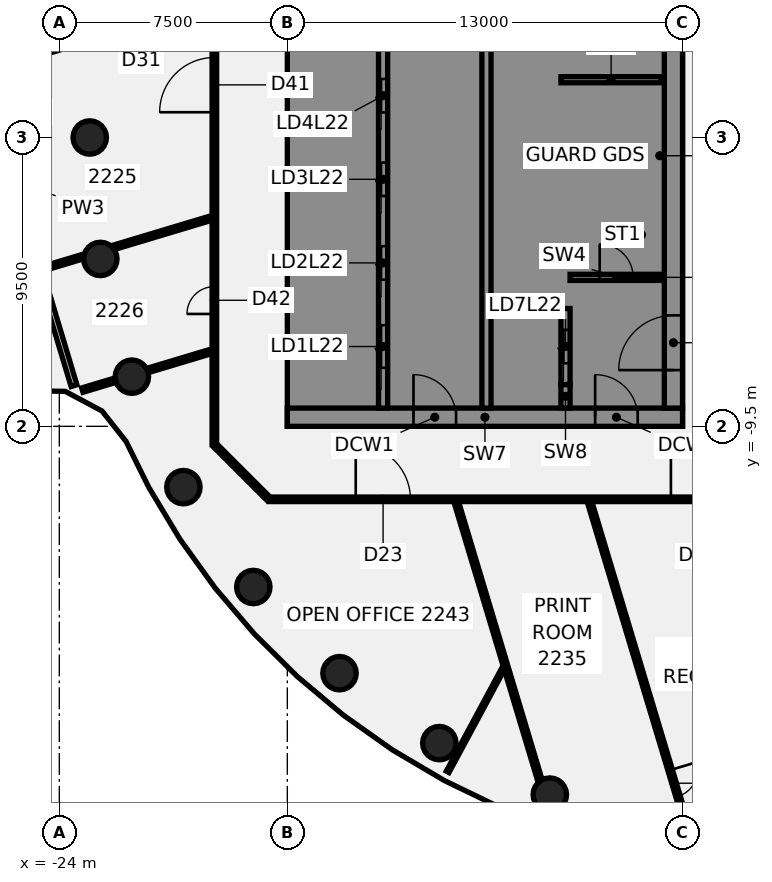
"""IFC4 building model, lengths in metres.
Left out: names, types, materials, properties, quantities, classifications, styles, units other than length and angle.
Written with IfcOpenShell. Run it as: python <this file> out.ifc"""

import sys

from ifc_helpers import new_model, si_unit, direction, frame, frame_2d, origin, origin_2d, place, context, subcontext, project, spatial, polyline, rectangle, circle, outline, extrude, element, fill, save


model = new_model("IFC4")
c1 = context("Model", 3, precision=1e-05, world=origin(), true_north=direction((0.0, 1.0)))
c2 = subcontext(c1, "Body", "Model", "MODEL_VIEW")
j1 = project(units=[si_unit("LENGTHUNIT", "METRE"), si_unit("PLANEANGLEUNIT", "RADIAN")], contexts=[c1])
p1 = place(None, origin())
s1 = spatial("IfcSite", under=j1, at=p1, CompositionType="ELEMENT")
p2 = place(p1, origin())
s2 = spatial("IfcBuilding", under=s1, at=p2, CompositionType="ELEMENT")
p3 = place(p2, frame((0.0, 0.0, 94.75)))
s3 = spatial("IfcBuildingStorey", under=s2, at=p3, CompositionType="ELEMENT", Elevation=94.75)
for number, where, z_axis, x_axis in (
    (1, (-23.0, 0.0, -0.14), (0.0, 0.0, 1.0), (1.0, 0.0, 0.0)),
    (2, (-22.651, -3.994, -0.14), (0.0, 0.0, 1.0), (1.0, 0.0, 0.0)),
    (3, (-21.613, -7.866, -0.14), (0.0, 0.0, 1.0), (1.0, 0.0, 0.0)),
    (4, (-19.919, -11.5, -0.14), (0.0, 0.0, 1.0), (1.0, 0.0, 0.0)),
    (5, (-17.619, -14.784, -0.14), (0.0, 0.0, 1.0), (1.0, 0.0, 0.0)),
    (6, (-14.784, -17.619, -0.14), (0.0, 0.0, 1.0), (1.0, 0.0, 0.0)),
    (7, (-11.5, -19.919, -0.14), (0.0, 0.0, 1.0), (1.0, 0.0, 0.0)),
    (8, (-7.866, -21.613, -0.14), (0.0, 0.0, 1.0), (1.0, 0.0, 0.0)),
):
    element("IfcColumn", number, at=place(p3, frame(where, z_axis=z_axis, x_axis=x_axis)), inside=s3, PredefinedType="COLUMN", context=c2, shape_type="SweptSolid", body=[
        extrude(circle(Radius=0.55, at=origin_2d()), origin(), (0.0, 0.0, 1.0), 3.75),
    ])
p4 = place(p3, frame((-27.567, 5.323, 0.0), z_axis=(0.0, 0.0, 1.0), x_axis=(0.287621482127, -0.957744163657, 0.0)))
e9 = element("IfcWall", 9, at=p4, inside=s3, PredefinedType="PARTITIONING", context=c2, shape_type="SweptSolid", body=[
    extrude(rectangle(XDim=14.08, YDim=0.2, at=frame_2d((7.04, 0.0))), origin(), (0.0, 0.0, 1.0), 3.01),
])
p5 = place(p4, frame((5.799, 0.0, 0.0)))
e10 = element("IfcOpeningElement", 10, at=p5, cuts=e9, PredefinedType="OPENING", context=c2, shape_type="SweptSolid", body=[
    extrude(rectangle(XDim=1.4, YDim=2.1, at=frame_2d((0.7, 1.05))), frame((0.0, 0.11, 0.0), z_axis=(0.0, -1.0, 0.0), x_axis=(1.0, 0.0, 0.0)), (0.0, 0.0, 1.0), 0.22),
])
p6 = place(p3, frame((-10.946, -11.977, 0.0), z_axis=(0.0, 0.0, 1.0), x_axis=(0.287700322185, -0.957720483552, 0.0)))
e11 = element("IfcWall", 11, at=p6, inside=s3, PredefinedType="PARTITIONING", context=c2, shape_type="SweptSolid", body=[
    extrude(rectangle(XDim=9.596, YDim=0.15, at=frame_2d((4.798, 0.0))), origin(), (0.0, 0.0, 1.0), 3.01),
])
p7 = place(p3, frame((-6.56, -11.977, 0.0), z_axis=(0.0, 0.0, 1.0), x_axis=(0.28763547446, -0.957739961489, 0.0)))
e12 = element("IfcWall", 12, at=p7, inside=s3, PredefinedType="PARTITIONING", context=c2, shape_type="SweptSolid", body=[
    extrude(rectangle(XDim=15.187, YDim=0.15, at=frame_2d((7.593, 0.0))), origin(), (0.0, 0.0, 1.0), 3.01),
])
p8 = place(p7, frame((9.22, 0.0, 0.0)))
e13 = element("IfcOpeningElement", 13, at=p8, cuts=e12, PredefinedType="OPENING", context=c2, shape_type="SweptSolid", body=[
    extrude(rectangle(XDim=0.9, YDim=2.1, at=frame_2d((0.45, 1.05))), frame((0.0, 0.085, 0.0), z_axis=(0.0, -1.0, 0.0), x_axis=(1.0, 0.0, 0.0)), (0.0, 0.0, 1.0), 0.17),
])
p9 = place(p3, frame((-18.872, -10.128, 0.0), z_axis=(0.0, 0.0, 1.0), x_axis=(0.707106781187, -0.707106781187, 0.0)))
e14 = element("IfcWall", 14, at=p9, inside=s3, PredefinedType="PARTITIONING", context=c2, shape_type="SweptSolid", body=[
    extrude(rectangle(XDim=2.465, YDim=0.15, at=frame_2d((1.232, 0.0))), origin(), (0.0, 0.0, 1.0), 3.01),
])
p10 = place(p3, frame((-17.1, -11.9, 0.0), z_axis=(0.0, 0.0, 1.0), x_axis=(1.0, 0.0, 0.0)))
e15 = element("IfcWall", 15, at=p10, inside=s3, PredefinedType="PARTITIONING", context=c2, shape_type="SweptSolid", body=[
    extrude(rectangle(XDim=34.165, YDim=0.15, at=frame_2d((17.083, 0.0))), origin(), (0.0, 0.0, 1.0), 3.01),
])
p11 = place(p10, frame((13.217, 0.0, 0.0)))
e16 = element("IfcOpeningElement", 16, at=p11, cuts=e15, PredefinedType="OPENING", context=c2, shape_type="SweptSolid", body=[
    extrude(rectangle(XDim=1.8, YDim=2.1, at=frame_2d((0.9, 1.05))), frame((0.0, 0.085, 0.0), z_axis=(0.0, -1.0, 0.0), x_axis=(1.0, 0.0, 0.0)), (0.0, 0.0, 1.0), 0.17),
])
p12 = place(p10, frame((2.85, 0.0, 0.0)))
e17 = element("IfcOpeningElement", 17, at=p12, cuts=e15, PredefinedType="OPENING", context=c2, shape_type="SweptSolid", body=[
    extrude(rectangle(XDim=1.8, YDim=2.1, at=frame_2d((0.9, 1.05))), frame((0.0, 0.085, 0.0), z_axis=(0.0, -1.0, 0.0), x_axis=(1.0, 0.0, 0.0)), (0.0, 0.0, 1.0), 0.17),
])
p13 = place(p10, frame((27.102, 0.0, 0.0)))
e18 = element("IfcOpeningElement", 18, at=p13, cuts=e15, PredefinedType="OPENING", context=c2, shape_type="SweptSolid", body=[
    extrude(rectangle(XDim=1.8, YDim=2.1, at=frame_2d((0.9, 1.05))), frame((0.0, 0.085, 0.0), z_axis=(0.0, -1.0, 0.0), x_axis=(1.0, 0.0, 0.0)), (0.0, 0.0, 1.0), 0.17),
])
p14 = place(p3, frame((-26.521, 2.192, 0.0), z_axis=(0.0, 0.0, 1.0), x_axis=(0.95773155265, 0.287663471886, 0.0)))
e19 = element("IfcWall", 19, at=p14, inside=s3, PredefinedType="PARTITIONING", context=c2, shape_type="SweptSolid", body=[
    extrude(rectangle(XDim=7.878, YDim=0.15, at=frame_2d((3.939, 0.0))), origin(), (0.0, 0.0, 1.0), 3.01),
])
p15 = place(p14, frame((5.0, 0.0, 0.0)))
e20 = element("IfcOpeningElement", 20, at=p15, cuts=e19, PredefinedType="OPENING", context=c2, shape_type="SweptSolid", body=[
    extrude(rectangle(XDim=0.9, YDim=2.1, at=frame_2d((0.45, 1.05))), frame((0.0, 0.085, 0.0), z_axis=(0.0, -1.0, 0.0), x_axis=(1.0, 0.0, 0.0)), (0.0, 0.0, 1.0), 0.17),
])
p16 = place(p3, frame((-24.565, -4.32, 0.0), z_axis=(0.0, 0.0, 1.0), x_axis=(0.957756211779, 0.287581360313, 0.0)))
e21 = element("IfcWall", 21, at=p16, inside=s3, PredefinedType="PARTITIONING", context=c2, shape_type="SweptSolid", body=[
    extrude(rectangle(XDim=1.439, YDim=0.15, at=frame_2d((0.719, 0.0))), origin(), (0.0, 0.0, 1.0), 3.01),
])
p17 = place(p3, frame((-22.253, -3.626, 0.0), z_axis=(0.0, 0.0, 1.0), x_axis=(0.957759484512, 0.287570460631, 0.0)))
e22 = element("IfcWall", 22, at=p17, inside=s3, PredefinedType="PARTITIONING", context=c2, shape_type="SweptSolid", body=[
    extrude(rectangle(XDim=3.421, YDim=0.15, at=frame_2d((1.711, 0.0))), origin(), (0.0, 0.0, 1.0), 3.01),
])
p18 = place(p3, frame((-23.243, -8.309, 0.0), z_axis=(0.0, 0.0, 1.0), x_axis=(0.957738472146, 0.287640433477, 0.0)))
e23 = element("IfcWall", 23, at=p18, inside=s3, PredefinedType="PARTITIONING", context=c2, shape_type="SweptSolid", body=[
    extrude(rectangle(XDim=1.148, YDim=0.15, at=frame_2d((0.574, 0.0))), origin(), (0.0, 0.0, 1.0), 3.01),
])
p19 = place(p3, frame((-21.106, -7.667, 0.0), z_axis=(0.0, 0.0, 1.0), x_axis=(0.957741640757, 0.287629882942, 0.0)))
e24 = element("IfcWall", 24, at=p19, inside=s3, PredefinedType="PARTITIONING", context=c2, shape_type="SweptSolid", body=[
    extrude(rectangle(XDim=2.224, YDim=0.15, at=frame_2d((1.112, 0.0))), origin(), (0.0, 0.0, 1.0), 3.01),
])
p20 = place(p3, frame((-11.227, -20.864, 0.0), z_axis=(0.0, 0.0, 1.0), x_axis=(0.473926336856, 0.880564493512, 0.0)))
e25 = element("IfcWall", 25, at=p20, inside=s3, PredefinedType="PARTITIONING", context=c2, shape_type="SweptSolid", body=[
    extrude(rectangle(XDim=3.861, YDim=0.1, at=frame_2d((1.93, 0.0))), origin(), (0.0, 0.0, 1.0), 3.01),
])
p21 = place(p3, frame((-18.9, -10.1, 0.0), z_axis=(0.0, 0.0, 1.0), x_axis=(0.0, 1.0, 0.0)))
e26 = element("IfcWall", 26, at=p21, inside=s3, PredefinedType="PARTITIONING", context=c2, shape_type="SweptSolid", body=[
    extrude(rectangle(XDim=20.2, YDim=0.15, at=frame_2d((10.1, 0.0))), origin(), (0.0, 0.0, 1.0), 3.01),
])
p22 = place(p21, frame((10.931, 0.0, 0.0)))
e27 = element("IfcOpeningElement", 27, at=p22, cuts=e26, PredefinedType="OPENING", context=c2, shape_type="SweptSolid", body=[
    extrude(rectangle(XDim=1.8, YDim=2.1, at=frame_2d((0.9, 1.05))), frame((0.0, 0.085, 0.0), z_axis=(0.0, -1.0, 0.0), x_axis=(1.0, 0.0, 0.0)), (0.0, 0.0, 1.0), 0.17),
])
p23 = place(p21, frame((4.296, 0.0, 0.0)))
e28 = element("IfcOpeningElement", 28, at=p23, cuts=e26, PredefinedType="OPENING", context=c2, shape_type="SweptSolid", body=[
    extrude(rectangle(XDim=0.9, YDim=2.1, at=frame_2d((0.45, 1.05))), frame((0.0, 0.085, 0.0), z_axis=(0.0, -1.0, 0.0), x_axis=(1.0, 0.0, 0.0)), (0.0, 0.0, 1.0), 0.17),
])
p24 = place(p3, frame((-16.5, -9.2, 0.0), z_axis=(0.0, 0.0, 1.0), x_axis=(1.0, 0.0, 0.0)))
e29 = element("IfcWall", 29, at=p24, inside=s3, PredefinedType="SHEAR", context=c2, shape_type="SweptSolid", body=[
    extrude(rectangle(XDim=13.0, YDim=0.6, at=frame_2d((6.5, 0.0))), origin(), (0.0, 0.0, 1.0), 3.61),
])
p25 = place(p24, frame((4.15, 0.0, 0.0)))
e30 = element("IfcOpeningElement", 30, at=p25, cuts=e29, PredefinedType="OPENING", context=c2, shape_type="SweptSolid", body=[
    extrude(rectangle(XDim=1.4, YDim=2.1, at=frame_2d((0.7, 1.05))), frame((0.0, 0.31, 0.0), z_axis=(0.0, -1.0, 0.0), x_axis=(1.0, 0.0, 0.0)), (0.0, 0.0, 1.0), 0.62),
])
p26 = place(p24, frame((10.125, 0.0, 0.0)))
e31 = element("IfcOpeningElement", 31, at=p26, cuts=e29, PredefinedType="OPENING", context=c2, shape_type="SweptSolid", body=[
    extrude(rectangle(XDim=1.4, YDim=2.1, at=frame_2d((0.7, 1.05))), frame((0.0, 0.31, 0.0), z_axis=(0.0, -1.0, 0.0), x_axis=(1.0, 0.0, 0.0)), (0.0, 0.0, 1.0), 0.62),
])
p27 = place(p3, origin())
e32 = element("IfcWall", 32, at=p27, inside=s3, PredefinedType="SHEAR", context=c2, shape_type="SweptSolid", body=[
    extrude(outline(polyline([(-13.5, -8.9), (-13.5, -8.125), (-15.9, -8.125), (-15.9, -5.625), (-13.5, -5.625), (-13.5, -5.375), (-15.9, -5.375), (-15.9, -2.875), (-13.5, -2.875), (-13.5, -2.625), (-15.9, -2.625), (-15.9, -0.125), (-13.5, -0.125), (-13.5, 0.125), (-15.9, 0.125), (-15.9, 2.625), (-13.5, 2.625), (-13.5, 2.875), (-15.9, 2.875), (-15.9, 5.375), (-13.5, 5.375), (-13.5, 5.625), (-15.9, 5.625), (-15.9, 8.125), (-13.5, 8.125), (-13.5, 8.9), (-15.9, 8.9), (-16.5, 8.9), (-16.5, -8.9), (-15.9, -8.9), (-13.5, -8.9)])), origin(), (0.0, 0.0, 1.0), 3.61),
])
p28 = place(p3, origin())
e33 = element("IfcWall", 33, at=p28, inside=s3, PredefinedType="SHEAR", context=c2, shape_type="SweptSolid", body=[
    extrude(outline(polyline([(-9.8, -5.375), (-9.8, -5.625), (-7.5, -5.625), (-7.2, -5.625), (-7.2, 8.9), (-7.5, 8.9), (-9.8, 8.9), (-9.8, 8.125), (-7.5, 8.125), (-7.5, 5.625), (-9.8, 5.625), (-9.8, 5.375), (-7.5, 5.375), (-7.5, 2.875), (-9.8, 2.875), (-9.8, 2.625), (-7.5, 2.625), (-7.5, 0.125), (-9.8, 0.125), (-9.8, -0.125), (-7.5, -0.125), (-7.5, -2.625), (-9.8, -2.625), (-9.8, -2.875), (-7.5, -2.875), (-7.5, -5.375), (-9.8, -5.375)])), origin(), (0.0, 0.0, 1.0), 3.61),
])
p29 = place(p3, origin())
e34 = element("IfcWall", 34, at=p29, inside=s3, PredefinedType="SHEAR", context=c2, shape_type="SweptSolid", body=[
    extrude(outline(polyline([(-7.5, -8.125), (-9.55, -8.125), (-9.55, -5.625), (-9.8, -5.625), (-9.8, -8.125), (-9.8, -8.9), (-7.5, -8.9), (-7.5, -8.125)])), origin(), (0.0, 0.0, 1.0), 3.61),
])
p30 = place(p3, frame((-7.35, -8.9, 0.0), z_axis=(0.0, 0.0, 1.0), x_axis=(0.0, 1.0, 0.0)))
e35 = element("IfcWall", 35, at=p30, inside=s3, PredefinedType="SHEAR", context=c2, shape_type="SweptSolid", body=[
    extrude(rectangle(XDim=0.775, YDim=0.3, at=frame_2d((0.387, 0.0))), origin(), (0.0, 0.0, 1.0), 3.61),
])
p31 = place(p3, frame((-7.5, 1.9, 0.0), z_axis=(0.0, 0.0, 1.0), x_axis=(1.0, 0.0, 0.0)))
e36 = element("IfcWall", 36, at=p31, inside=s3, PredefinedType="SHEAR", context=c2, shape_type="SweptSolid", body=[
    extrude(rectangle(XDim=3.3, YDim=0.2, at=frame_2d((1.65, 0.0))), origin(), (0.0, 0.0, 1.0), 3.61),
])
p32 = place(p3, frame((-13.35, -8.9, 0.0), z_axis=(0.0, 0.0, 1.0), x_axis=(0.0, 1.0, 0.0)))
e37 = element("IfcWall", 37, at=p32, inside=s3, PredefinedType="SHEAR", context=c2, shape_type="SweptSolid", body=[
    extrude(rectangle(XDim=17.8, YDim=0.3, at=frame_2d((8.9, 0.0))), origin(), (0.0, 0.0, 1.0), 3.61),
])
p33 = place(p32, frame((1.325, 0.0, 0.0)))
e38 = element("IfcOpeningElement", 38, at=p33, cuts=e37, PredefinedType="OPENING", context=c2, shape_type="SweptSolid", body=[
    extrude(rectangle(XDim=1.4, YDim=2.1, at=frame_2d((0.7, 1.05))), frame((0.0, 0.16, 0.0), z_axis=(0.0, -1.0, 0.0), x_axis=(1.0, 0.0, 0.0)), (0.0, 0.0, 1.0), 0.32),
])
p34 = place(p32, frame((4.225, 0.0, 0.0)))
e39 = element("IfcOpeningElement", 39, at=p34, cuts=e37, PredefinedType="OPENING", context=c2, shape_type="SweptSolid", body=[
    extrude(rectangle(XDim=1.1, YDim=2.1, at=frame_2d((0.55, 1.05))), frame((0.0, 0.16, 0.0), z_axis=(0.0, -1.0, 0.0), x_axis=(1.0, 0.0, 0.0)), (0.0, 0.0, 1.0), 0.32),
])
p35 = place(p32, frame((6.975, 0.0, 0.0)))
e40 = element("IfcOpeningElement", 40, at=p35, cuts=e37, PredefinedType="OPENING", context=c2, shape_type="SweptSolid", body=[
    extrude(rectangle(XDim=1.1, YDim=2.1, at=frame_2d((0.55, 1.05))), frame((0.0, 0.16, 0.0), z_axis=(0.0, -1.0, 0.0), x_axis=(1.0, 0.0, 0.0)), (0.0, 0.0, 1.0), 0.32),
])
p36 = place(p32, frame((9.725, 0.0, 0.0)))
e41 = element("IfcOpeningElement", 41, at=p36, cuts=e37, PredefinedType="OPENING", context=c2, shape_type="SweptSolid", body=[
    extrude(rectangle(XDim=1.1, YDim=2.1, at=frame_2d((0.55, 1.05))), frame((0.0, 0.16, 0.0), z_axis=(0.0, -1.0, 0.0), x_axis=(1.0, 0.0, 0.0)), (0.0, 0.0, 1.0), 0.32),
])
p37 = place(p32, frame((12.475, 0.0, 0.0)))
e42 = element("IfcOpeningElement", 42, at=p37, cuts=e37, PredefinedType="OPENING", context=c2, shape_type="SweptSolid", body=[
    extrude(rectangle(XDim=1.1, YDim=2.1, at=frame_2d((0.55, 1.05))), frame((0.0, 0.16, 0.0), z_axis=(0.0, -1.0, 0.0), x_axis=(1.0, 0.0, 0.0)), (0.0, 0.0, 1.0), 0.32),
])
p38 = place(p3, frame((-9.95, -8.9, 0.0), z_axis=(0.0, 0.0, 1.0), x_axis=(0.0, 1.0, 0.0)))
e43 = element("IfcWall", 43, at=p38, inside=s3, PredefinedType="SHEAR", context=c2, shape_type="SweptSolid", body=[
    extrude(rectangle(XDim=17.8, YDim=0.3, at=frame_2d((8.9, 0.0))), origin(), (0.0, 0.0, 1.0), 3.61),
])
p39 = place(p3, frame((-7.35, -8.125, 0.0), z_axis=(0.0, 0.0, 1.0), x_axis=(0.0, 1.0, 0.0)))
e44 = element("IfcWall", 44, at=p39, inside=s3, PredefinedType="SHEAR", context=c2, shape_type="SweptSolid", body=[
    extrude(rectangle(XDim=2.5, YDim=0.3, at=frame_2d((1.25, 0.0))), origin(), (0.0, 0.0, 1.0), 3.61),
])
p40 = place(p39, frame((0.7, 0.0, 0.0)))
e45 = element("IfcOpeningElement", 45, at=p40, cuts=e44, PredefinedType="OPENING", context=c2, shape_type="SweptSolid", body=[
    extrude(rectangle(XDim=1.1, YDim=2.1, at=frame_2d((0.55, 1.05))), frame((0.0, 0.16, 0.0), z_axis=(0.0, -1.0, 0.0), x_axis=(1.0, 0.0, 0.0)), (0.0, 0.0, 1.0), 0.32),
])
p41 = place(p3, frame((-3.8, -8.9, 0.0), z_axis=(0.0, 0.0, 1.0), x_axis=(0.0, 1.0, 0.0)))
e46 = element("IfcWall", 46, at=p41, inside=s3, PredefinedType="SHEAR", context=c2, shape_type="SweptSolid", body=[
    extrude(rectangle(XDim=17.8, YDim=0.6, at=frame_2d((8.9, 0.0))), origin(), (0.0, 0.0, 1.0), 3.61),
])
p42 = place(p41, frame((1.25, 0.0, 0.0)))
e47 = element("IfcOpeningElement", 47, at=p42, cuts=e46, PredefinedType="OPENING", context=c2, shape_type="SweptSolid", body=[
    extrude(rectangle(XDim=1.8, YDim=2.1, at=frame_2d((0.9, 1.05))), frame((0.0, 0.31, 0.0), z_axis=(0.0, -1.0, 0.0), x_axis=(1.0, 0.0, 0.0)), (0.0, 0.0, 1.0), 0.62),
])
p43 = place(p41, frame((12.377, 0.0, 0.0)))
e48 = element("IfcOpeningElement", 48, at=p43, cuts=e46, PredefinedType="OPENING", context=c2, shape_type="SweptSolid", body=[
    extrude(rectangle(XDim=1.0, YDim=2.1, at=frame_2d((0.5, 1.05))), frame((0.0, 0.31, 0.0), z_axis=(0.0, -1.0, 0.0), x_axis=(1.0, 0.0, 0.0)), (0.0, 0.0, 1.0), 0.62),
])
p44 = place(p41, frame((15.903, 0.0, 0.0)))
e49 = element("IfcOpeningElement", 49, at=p44, cuts=e46, PredefinedType="OPENING", context=c2, shape_type="SweptSolid", body=[
    extrude(rectangle(XDim=1.0, YDim=2.1, at=frame_2d((0.5, 1.05))), frame((0.0, 0.31, 0.0), z_axis=(0.0, -1.0, 0.0), x_axis=(1.0, 0.0, 0.0)), (0.0, 0.0, 1.0), 0.62),
])
p45 = place(p3, frame((-7.2, -4.6, 0.0), z_axis=(0.0, 0.0, 1.0), x_axis=(1.0, 0.0, 0.0)))
e50 = element("IfcWall", 50, at=p45, inside=s3, PredefinedType="SHEAR", context=c2, shape_type="SweptSolid", body=[
    extrude(rectangle(XDim=3.1, YDim=0.2, at=frame_2d((1.55, 0.0))), origin(), (0.0, 0.0, 1.0), 3.61),
])
p46 = place(p45, frame((0.975, 0.0, 0.0)))
e51 = element("IfcOpeningElement", 51, at=p46, cuts=e50, PredefinedType="OPENING", context=c2, shape_type="SweptSolid", body=[
    extrude(rectangle(XDim=1.1, YDim=2.1, at=frame_2d((0.55, 1.05))), frame((0.0, 0.11, 0.0), z_axis=(0.0, -1.0, 0.0), x_axis=(1.0, 0.0, 0.0)), (0.0, 0.0, 1.0), 0.22),
])
p47 = place(p8, frame((0.9, 0.0, 0.0), z_axis=(0.0, 0.0, 1.0), x_axis=(-1.0, 0.0, 0.0)))
e52 = element("IfcDoor", 52, at=p47, inside=s3, OperationType="SINGLE_SWING_RIGHT", PredefinedType="DOOR", context=c2, shape_type="SweptSolid", body=[
    extrude(rectangle(XDim=0.9, YDim=2.1, at=frame_2d((0.45, 1.05))), frame((0.0, 0.025, 0.0), z_axis=(0.0, -1.0, 0.0), x_axis=(1.0, 0.0, 0.0)), (0.0, 0.0, 1.0), 0.05),
])
fill(e13, e52)
p48 = place(p11, origin())
e53 = element("IfcDoor", 53, at=p48, inside=s3, OperationType="DOUBLE_DOOR_SINGLE_SWING", PredefinedType="DOOR", context=c2, shape_type="SweptSolid", body=[
    extrude(rectangle(XDim=1.8, YDim=2.1, at=frame_2d((0.9, 1.05))), frame((0.0, 0.025, 0.0), z_axis=(0.0, -1.0, 0.0), x_axis=(1.0, 0.0, 0.0)), (0.0, 0.0, 1.0), 0.05),
])
fill(e16, e53)
p49 = place(p12, frame((1.8, 0.0, 0.0), z_axis=(0.0, 0.0, 1.0), x_axis=(-1.0, 0.0, 0.0)))
e54 = element("IfcDoor", 54, at=p49, inside=s3, OperationType="DOUBLE_DOOR_SINGLE_SWING", PredefinedType="DOOR", context=c2, shape_type="SweptSolid", body=[
    extrude(rectangle(XDim=1.8, YDim=2.1, at=frame_2d((0.9, 1.05))), frame((0.0, 0.025, 0.0), z_axis=(0.0, -1.0, 0.0), x_axis=(1.0, 0.0, 0.0)), (0.0, 0.0, 1.0), 0.05),
])
fill(e17, e54)
p50 = place(p22, frame((1.8, 0.0, 0.0), z_axis=(0.0, 0.0, 1.0), x_axis=(-1.0, 0.0, 0.0)))
e55 = element("IfcDoor", 55, at=p50, inside=s3, OperationType="DOUBLE_DOOR_SINGLE_SWING", PredefinedType="DOOR", context=c2, shape_type="SweptSolid", body=[
    extrude(rectangle(XDim=1.8, YDim=2.1, at=frame_2d((0.9, 1.05))), frame((0.0, 0.025, 0.0), z_axis=(0.0, -1.0, 0.0), x_axis=(1.0, 0.0, 0.0)), (0.0, 0.0, 1.0), 0.05),
])
fill(e27, e55)
p51 = place(p23, origin())
e56 = element("IfcDoor", 56, at=p51, inside=s3, OperationType="SINGLE_SWING_RIGHT", PredefinedType="DOOR", context=c2, shape_type="SweptSolid", body=[
    extrude(rectangle(XDim=0.9, YDim=2.1, at=frame_2d((0.45, 1.05))), frame((0.0, 0.025, 0.0), z_axis=(0.0, -1.0, 0.0), x_axis=(1.0, 0.0, 0.0)), (0.0, 0.0, 1.0), 0.05),
])
fill(e28, e56)
p52 = place(p25, origin())
e57 = element("IfcDoor", 57, at=p52, inside=s3, OperationType="SINGLE_SWING_LEFT", PredefinedType="DOOR", context=c2, shape_type="SweptSolid", body=[
    extrude(rectangle(XDim=1.4, YDim=2.1, at=frame_2d((0.7, 1.05))), frame((0.0, 0.025, 0.0), z_axis=(0.0, -1.0, 0.0), x_axis=(1.0, 0.0, 0.0)), (0.0, 0.0, 1.0), 0.05),
])
fill(e30, e57)
p53 = place(p26, origin())
e58 = element("IfcDoor", 58, at=p53, inside=s3, OperationType="SINGLE_SWING_LEFT", PredefinedType="DOOR", context=c2, shape_type="SweptSolid", body=[
    extrude(rectangle(XDim=1.4, YDim=2.1, at=frame_2d((0.7, 1.05))), frame((0.0, 0.025, 0.0), z_axis=(0.0, -1.0, 0.0), x_axis=(1.0, 0.0, 0.0)), (0.0, 0.0, 1.0), 0.05),
])
fill(e31, e58)
p54 = place(p42, origin())
e59 = element("IfcDoor", 59, at=p54, inside=s3, OperationType="SINGLE_SWING_LEFT", PredefinedType="DOOR", context=c2, shape_type="SweptSolid", body=[
    extrude(rectangle(XDim=1.8, YDim=2.1, at=frame_2d((0.9, 1.05))), frame((0.0, 0.025, 0.0), z_axis=(0.0, -1.0, 0.0), x_axis=(1.0, 0.0, 0.0)), (0.0, 0.0, 1.0), 0.05),
])
fill(e47, e59)
p55 = place(p46, origin())
e60 = element("IfcDoor", 60, at=p55, inside=s3, OperationType="SINGLE_SWING_LEFT", PredefinedType="DOOR", context=c2, shape_type="SweptSolid", body=[
    extrude(rectangle(XDim=1.1, YDim=2.1, at=frame_2d((0.55, 1.05))), frame((0.0, 0.025, 0.0), z_axis=(0.0, -1.0, 0.0), x_axis=(1.0, 0.0, 0.0)), (0.0, 0.0, 1.0), 0.05),
])
fill(e51, e60)
p56 = place(p33, origin())
e61 = element("IfcDoor", 61, at=p56, inside=s3, OperationType="SLIDING_TO_LEFT", PredefinedType="DOOR", context=c2, shape_type="SweptSolid", body=[
    extrude(rectangle(XDim=1.4, YDim=2.1, at=frame_2d((0.7, 1.05))), frame((0.0, 0.025, 0.0), z_axis=(0.0, -1.0, 0.0), x_axis=(1.0, 0.0, 0.0)), (0.0, 0.0, 1.0), 0.05),
])
fill(e38, e61)
p57 = place(p34, origin())
e62 = element("IfcDoor", 62, at=p57, inside=s3, OperationType="SLIDING_TO_LEFT", PredefinedType="DOOR", context=c2, shape_type="SweptSolid", body=[
    extrude(rectangle(XDim=1.1, YDim=2.1, at=frame_2d((0.55, 1.05))), frame((0.0, 0.025, 0.0), z_axis=(0.0, -1.0, 0.0), x_axis=(1.0, 0.0, 0.0)), (0.0, 0.0, 1.0), 0.05),
])
fill(e39, e62)
p58 = place(p35, origin())
e63 = element("IfcDoor", 63, at=p58, inside=s3, OperationType="SLIDING_TO_LEFT", PredefinedType="DOOR", context=c2, shape_type="SweptSolid", body=[
    extrude(rectangle(XDim=1.1, YDim=2.1, at=frame_2d((0.55, 1.05))), frame((0.0, 0.025, 0.0), z_axis=(0.0, -1.0, 0.0), x_axis=(1.0, 0.0, 0.0)), (0.0, 0.0, 1.0), 0.05),
])
fill(e40, e63)
p59 = place(p36, origin())
e64 = element("IfcDoor", 64, at=p59, inside=s3, OperationType="SLIDING_TO_LEFT", PredefinedType="DOOR", context=c2, shape_type="SweptSolid", body=[
    extrude(rectangle(XDim=1.1, YDim=2.1, at=frame_2d((0.55, 1.05))), frame((0.0, 0.025, 0.0), z_axis=(0.0, -1.0, 0.0), x_axis=(1.0, 0.0, 0.0)), (0.0, 0.0, 1.0), 0.05),
])
fill(e41, e64)
p60 = place(p40, origin())
e65 = element("IfcDoor", 65, at=p60, inside=s3, OperationType="SLIDING_TO_LEFT", PredefinedType="DOOR", context=c2, shape_type="SweptSolid", body=[
    extrude(rectangle(XDim=1.1, YDim=2.1, at=frame_2d((0.55, 1.05))), frame((0.0, 0.025, 0.0), z_axis=(0.0, -1.0, 0.0), x_axis=(1.0, 0.0, 0.0)), (0.0, 0.0, 1.0), 0.05),
])
fill(e45, e65)
save(model, sys.argv[1])
